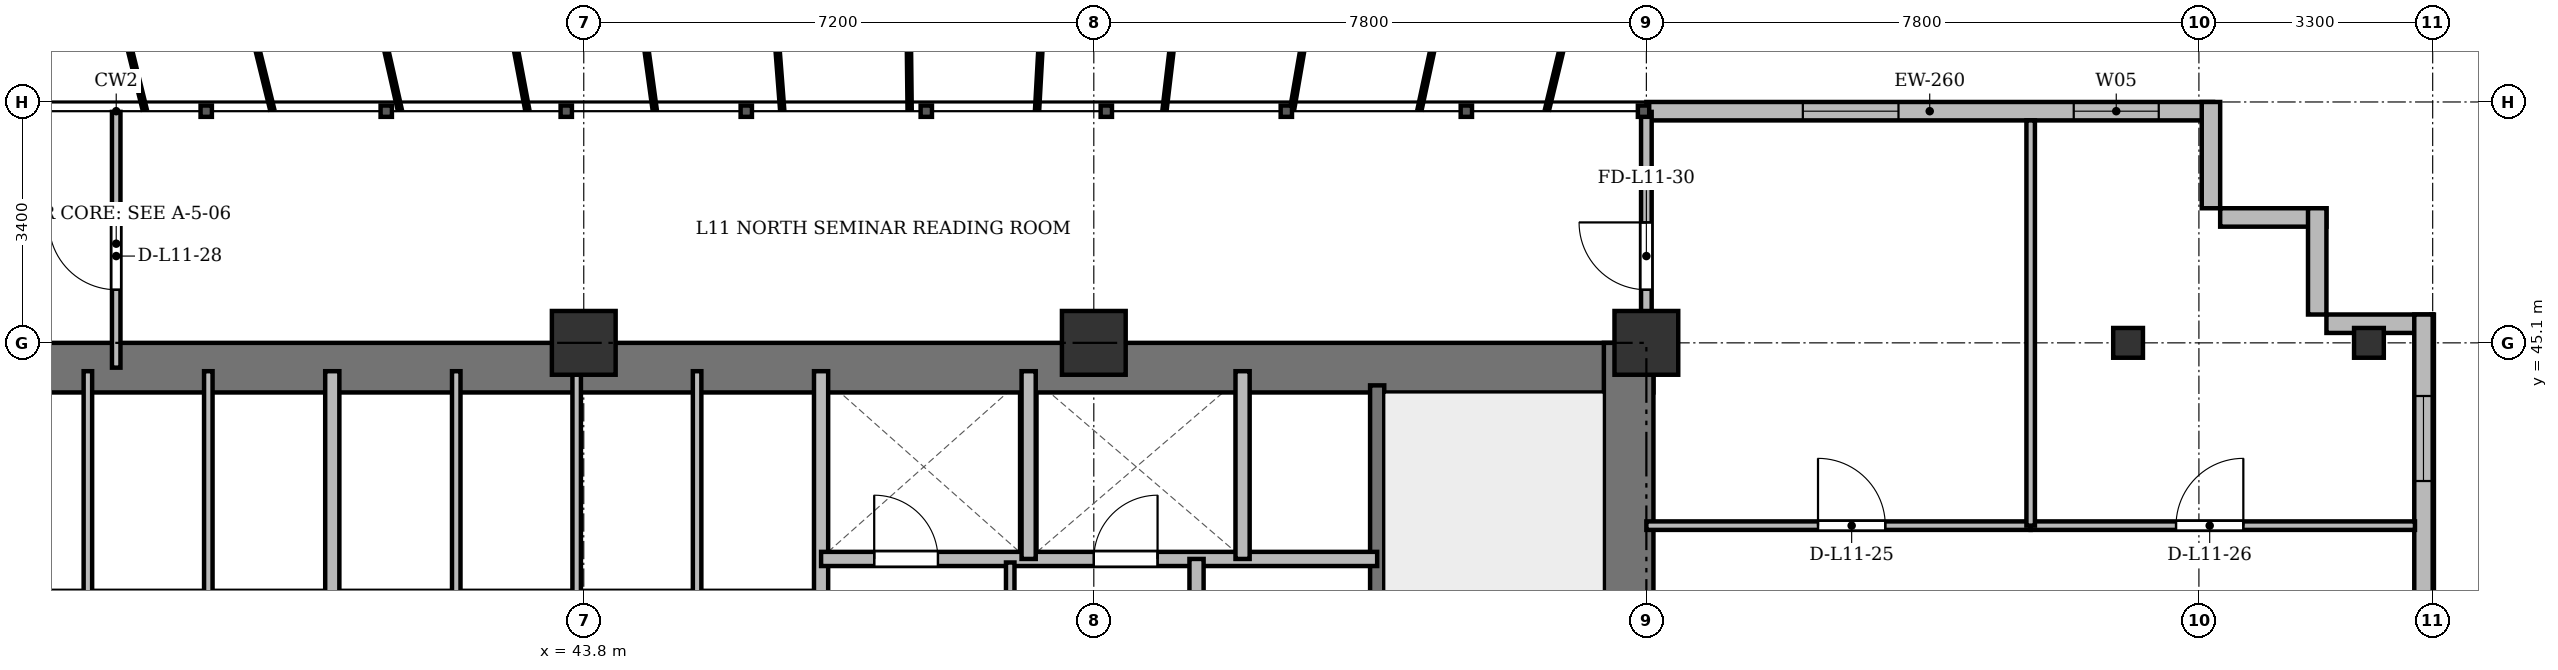
"""IFC4 building model, lengths in metres.
Left out: names, types, materials, properties, quantities, classifications, styles, units other than length and angle.
Written with IfcOpenShell. Run it as: python <this file> out.ifc"""

import sys

from ifc_helpers import new_model, si_unit, direction, frame, frame_2d, origin, origin_2d, place, context, subcontext, project, spatial, rectangle, i_section, extrude, source, transform, mapped, element, fill, save


model = new_model("IFC4")
c1 = context("Model", 3, precision=1e-05, world=origin(), true_north=direction((0.0, 1.0)))
c2 = subcontext(c1, "Body", "Model", "MODEL_VIEW")
j1 = project(units=[si_unit("LENGTHUNIT", "METRE"), si_unit("PLANEANGLEUNIT", "RADIAN")], contexts=[c1])
p1 = place(None, origin())
s1 = spatial("IfcSite", under=j1, at=p1, CompositionType="ELEMENT")
p2 = place(p1, origin())
s2 = spatial("IfcBuilding", under=s1, at=p2, CompositionType="ELEMENT")
p3 = place(p2, frame((0.0, 0.0, 45.1)))
s3 = spatial("IfcBuildingStorey", under=s2, at=p3, CompositionType="ELEMENT", Elevation=45.1)
m1 = source(origin(), c2, "Body", "SweptSolid", [
    extrude(rectangle(XDim=0.9, YDim=0.9, at=origin_2d()), origin(), (0.0, 0.0, 1.0), 3.6),
])
for number, where, z_axis, x_axis in (
    (1, (43.8, 45.1, 0.0), (0.0, 0.0, 1.0), (1.0, 0.0, 0.0)),
    (2, (51.0, 45.1, 0.0), (0.0, 0.0, 1.0), (1.0, 0.0, 0.0)),
    (3, (58.8, 45.1, 0.0), (0.0, 0.0, 1.0), (1.0, 0.0, 0.0)),
):
    element("IfcColumn", number, at=place(p3, frame(where, z_axis=z_axis, x_axis=x_axis)), inside=s3, PredefinedType="COLUMN", context=c2, shape_type="MappedRepresentation", body=[
        mapped(m1, transform((0.0, 0.0, 0.0), x_axis=(1.0, 0.0, 0.0), y_axis=(0.0, 1.0, 0.0), z_axis=(0.0, 0.0, 1.0), scale=1.0)),
    ])
m2 = source(origin(), c2, "Body", "SweptSolid", [
    extrude(i_section(OverallWidth=0.42, OverallDepth=0.42, WebThickness=0.026, FlangeThickness=0.04, at=origin_2d()), origin(), (0.0, 0.0, 1.0), 3.6),
])
for number, where, z_axis, x_axis in (
    (4, (65.6, 45.1, 0.0), (0.0, 0.0, 1.0), (1.0, 0.0, 0.0)),
    (5, (69.0, 45.1, 0.0), (0.0, 0.0, 1.0), (1.0, 0.0, 0.0)),
):
    element("IfcColumn", number, at=place(p3, frame(where, z_axis=z_axis, x_axis=x_axis)), inside=s3, PredefinedType="COLUMN", context=c2, shape_type="MappedRepresentation", body=[
        mapped(m2, transform((0.0, 0.0, 0.0), x_axis=(1.0, 0.0, 0.0), y_axis=(0.0, 1.0, 0.0), z_axis=(0.0, 0.0, 1.0), scale=1.0)),
    ])
p4 = place(p3, frame((58.8, 48.37, 0.0), z_axis=(0.0, 0.0, 1.0), x_axis=(1.0, 0.0, 0.0)))
e6 = element("IfcWall", 6, at=p4, inside=s3, PredefinedType="SOLIDWALL", context=c2, shape_type="SweptSolid", body=[
    extrude(rectangle(XDim=8.0, YDim=0.26, at=frame_2d((4.0, 0.0))), origin(), (0.0, 0.0, 1.0), 3.34),
])
p5 = place(p4, frame((2.209, 0.0, 0.9)))
e7 = element("IfcOpeningElement", 7, at=p5, cuts=e6, PredefinedType="OPENING", context=c2, shape_type="SweptSolid", body=[
    extrude(rectangle(XDim=1.35, YDim=1.5, at=frame_2d((0.675, 0.75))), frame((0.0, 0.14, 0.0), z_axis=(0.0, -1.0, 0.0), x_axis=(1.0, 0.0, 0.0)), (0.0, 0.0, 1.0), 0.28),
])
p6 = place(p4, frame((6.033, 0.0, 0.9)))
e8 = element("IfcOpeningElement", 8, at=p6, cuts=e6, PredefinedType="OPENING", context=c2, shape_type="SweptSolid", body=[
    extrude(rectangle(XDim=1.2, YDim=1.65, at=frame_2d((0.6, 0.825))), frame((0.0, 0.14, 0.0), z_axis=(0.0, -1.0, 0.0), x_axis=(1.0, 0.0, 0.0)), (0.0, 0.0, 1.0), 0.28),
])
for number, where, z_axis, x_axis in (
    (9, (66.77, 48.5, 0.0), (0.0, 0.0, 1.0), (0.0, -1.0, 0.0)),
    (10, (66.9, 46.87, 0.0), (0.0, 0.0, 1.0), (1.0, 0.0, 0.0)),
    (11, (68.27, 47.0, 0.0), (0.0, 0.0, 1.0), (0.0, -1.0, 0.0)),
):
    element("IfcWall", number, at=place(p3, frame(where, z_axis=z_axis, x_axis=x_axis)), inside=s3, PredefinedType="SOLIDWALL", context=c2, shape_type="SweptSolid", body=[
        extrude(rectangle(XDim=1.5, YDim=0.26, at=frame_2d((0.75, 0.0))), origin(), (0.0, 0.0, 1.0), 3.34),
    ])
p7 = place(p3, frame((68.4, 45.37, 0.0), z_axis=(0.0, 0.0, 1.0), x_axis=(1.0, 0.0, 0.0)))
e12 = element("IfcWall", 12, at=p7, inside=s3, PredefinedType="SOLIDWALL", context=c2, shape_type="SweptSolid", body=[
    extrude(rectangle(XDim=1.5, YDim=0.26, at=frame_2d((0.75, 0.0))), origin(), (0.0, 0.0, 1.0), 2.69),
])
p8 = place(p3, frame((69.77, 45.5, 0.0), z_axis=(0.0, 0.0, 1.0), x_axis=(0.0, -1.0, 0.0)))
e13 = element("IfcWall", 13, at=p8, inside=s3, PredefinedType="SOLIDWALL", context=c2, shape_type="SweptSolid", body=[
    extrude(rectangle(XDim=39.6, YDim=0.26, at=frame_2d((19.8, 0.0))), origin(), (0.0, 0.0, 1.0), 3.34),
])
p9 = place(p8, frame((36.95, 0.0, 0.92)))
e14 = element("IfcOpeningElement", 14, at=p9, cuts=e13, PredefinedType="OPENING", context=c2, shape_type="SweptSolid", body=[
    extrude(rectangle(XDim=1.2, YDim=1.65, at=frame_2d((0.6, 0.825))), frame((0.0, 0.14, 0.0), z_axis=(0.0, -1.0, 0.0), x_axis=(1.0, 0.0, 0.0)), (0.0, 0.0, 1.0), 0.28),
])
p10 = place(p8, frame((32.9, 0.0, 0.92)))
e15 = element("IfcOpeningElement", 15, at=p10, cuts=e13, PredefinedType="OPENING", context=c2, shape_type="SweptSolid", body=[
    extrude(rectangle(XDim=2.4, YDim=2.1, at=frame_2d((1.2, 1.05))), frame((0.0, 0.14, 0.0), z_axis=(0.0, -1.0, 0.0), x_axis=(1.0, 0.0, 0.0)), (0.0, 0.0, 1.0), 0.28),
])
p11 = place(p8, frame((28.7, 0.0, 0.92)))
e16 = element("IfcOpeningElement", 16, at=p11, cuts=e13, PredefinedType="OPENING", context=c2, shape_type="SweptSolid", body=[
    extrude(rectangle(XDim=2.4, YDim=2.1, at=frame_2d((1.2, 1.05))), frame((0.0, 0.14, 0.0), z_axis=(0.0, -1.0, 0.0), x_axis=(1.0, 0.0, 0.0)), (0.0, 0.0, 1.0), 0.28),
])
p12 = place(p8, frame((21.5, 0.0, 0.92)))
e17 = element("IfcOpeningElement", 17, at=p12, cuts=e13, PredefinedType="OPENING", context=c2, shape_type="SweptSolid", body=[
    extrude(rectangle(XDim=2.4, YDim=2.1, at=frame_2d((1.2, 1.05))), frame((0.0, 0.14, 0.0), z_axis=(0.0, -1.0, 0.0), x_axis=(1.0, 0.0, 0.0)), (0.0, 0.0, 1.0), 0.28),
])
p13 = place(p8, frame((7.5, 0.0, 0.92)))
e18 = element("IfcOpeningElement", 18, at=p13, cuts=e13, PredefinedType="OPENING", context=c2, shape_type="SweptSolid", body=[
    extrude(rectangle(XDim=2.4, YDim=2.1, at=frame_2d((1.2, 1.05))), frame((0.0, 0.14, 0.0), z_axis=(0.0, -1.0, 0.0), x_axis=(1.0, 0.0, 0.0)), (0.0, 0.0, 1.0), 0.28),
])
p14 = place(p8, frame((4.5, 0.0, 0.92)))
e19 = element("IfcOpeningElement", 19, at=p14, cuts=e13, PredefinedType="OPENING", context=c2, shape_type="SweptSolid", body=[
    extrude(rectangle(XDim=1.2, YDim=1.65, at=frame_2d((0.6, 0.825))), frame((0.0, 0.14, 0.0), z_axis=(0.0, -1.0, 0.0), x_axis=(1.0, 0.0, 0.0)), (0.0, 0.0, 1.0), 0.28),
])
p15 = place(p8, frame((1.15, 0.0, 0.92)))
e20 = element("IfcOpeningElement", 20, at=p15, cuts=e13, PredefinedType="OPENING", context=c2, shape_type="SweptSolid", body=[
    extrude(rectangle(XDim=1.2, YDim=1.65, at=frame_2d((0.6, 0.825))), frame((0.0, 0.14, 0.0), z_axis=(0.0, -1.0, 0.0), x_axis=(1.0, 0.0, 0.0)), (0.0, 0.0, 1.0), 0.28),
])
p16 = place(p3, frame((15.5, 44.75, 0.0), z_axis=(0.0, 0.0, 1.0), x_axis=(1.0, 0.0, 0.0)))
e21 = element("IfcWall", 21, at=p16, inside=s3, PredefinedType="SHEAR", context=c2, shape_type="SweptSolid", body=[
    extrude(rectangle(XDim=43.4, YDim=0.7, at=frame_2d((21.7, 0.0))), origin(), (0.0, 0.0, 1.0), 3.34),
])
p17 = place(p3, frame((58.55, 33.4, 0.0), z_axis=(0.0, 0.0, 1.0), x_axis=(0.0, 1.0, 0.0)))
e22 = element("IfcWall", 22, at=p17, inside=s3, PredefinedType="SHEAR", context=c2, shape_type="SweptSolid", body=[
    extrude(rectangle(XDim=11.7, YDim=0.7, at=frame_2d((5.85, 0.0))), origin(), (0.0, 0.0, 1.0), 3.34),
])
p18 = place(p3, frame((55.0, 33.4, 0.0), z_axis=(0.0, 0.0, 1.0), x_axis=(0.0, 1.0, 0.0)))
e23 = element("IfcWall", 23, at=p18, inside=s3, PredefinedType="SHEAR", context=c2, shape_type="SweptSolid", body=[
    extrude(rectangle(XDim=11.1, YDim=0.2, at=frame_2d((5.55, 0.0))), origin(), (0.0, 0.0, 1.0), 3.34),
])
p19 = place(p18, frame((0.85, 0.0, 0.0)))
e24 = element("IfcOpeningElement", 24, at=p19, cuts=e23, PredefinedType="OPENING", context=c2, shape_type="SweptSolid", body=[
    extrude(rectangle(XDim=1.1, YDim=2.15, at=frame_2d((0.55, 1.075))), frame((0.0, 0.11, 0.0), z_axis=(0.0, -1.0, 0.0), x_axis=(1.0, 0.0, 0.0)), (0.0, 0.0, 1.0), 0.22),
])
for number, where, z_axis, x_axis in (
    (25, (36.8, 41.5, 0.0), (0.0, 0.0, 1.0), (0.0, 1.0, 0.0)),
    (26, (38.5, 41.5, 0.0), (0.0, 0.0, 1.0), (0.0, 1.0, 0.0)),
):
    element("IfcWall", number, at=place(p3, frame(where, z_axis=z_axis, x_axis=x_axis)), inside=s3, PredefinedType="PARTITIONING", context=c2, shape_type="SweptSolid", body=[
        extrude(rectangle(XDim=3.2, YDim=0.12, at=frame_2d((1.6, 0.0))), origin(), (0.0, 0.0, 1.0), 3.34),
    ])
p20 = place(p3, frame((40.25, 41.5, 0.0), z_axis=(0.0, 0.0, 1.0), x_axis=(0.0, 1.0, 0.0)))
e27 = element("IfcWall", 27, at=p20, inside=s3, PredefinedType="SOLIDWALL", context=c2, shape_type="SweptSolid", body=[
    extrude(rectangle(XDim=3.2, YDim=0.2, at=frame_2d((1.6, 0.0))), origin(), (0.0, 0.0, 1.0), 3.34),
])
p21 = place(p3, frame((42.0, 41.5, 0.0), z_axis=(0.0, 0.0, 1.0), x_axis=(0.0, 1.0, 0.0)))
e28 = element("IfcWall", 28, at=p21, inside=s3, PredefinedType="PARTITIONING", context=c2, shape_type="SweptSolid", body=[
    extrude(rectangle(XDim=3.2, YDim=0.12, at=frame_2d((1.6, 0.0))), origin(), (0.0, 0.0, 1.0), 3.34),
])
p22 = place(p3, frame((43.7, 41.5, 0.0), z_axis=(0.0, 0.0, 1.0), x_axis=(0.0, 1.0, 0.0)))
e29 = element("IfcWall", 29, at=p22, inside=s3, PredefinedType="PARTITIONING", context=c2, shape_type="SweptSolid", body=[
    extrude(rectangle(XDim=3.2, YDim=0.12, at=frame_2d((1.6, 0.0))), origin(), (0.0, 0.0, 1.0), 2.752),
])
p23 = place(p3, frame((45.4, 41.5, 0.0), z_axis=(0.0, 0.0, 1.0), x_axis=(0.0, 1.0, 0.0)))
e30 = element("IfcWall", 30, at=p23, inside=s3, PredefinedType="PARTITIONING", context=c2, shape_type="SweptSolid", body=[
    extrude(rectangle(XDim=3.2, YDim=0.12, at=frame_2d((1.6, 0.0))), origin(), (0.0, 0.0, 1.0), 3.34),
])
p24 = place(p3, frame((47.15, 33.4, 0.0), z_axis=(0.0, 0.0, 1.0), x_axis=(0.0, 1.0, 0.0)))
e31 = element("IfcWall", 31, at=p24, inside=s3, PredefinedType="SOLIDWALL", context=c2, shape_type="SweptSolid", body=[
    extrude(rectangle(XDim=11.3, YDim=0.2, at=frame_2d((5.65, 0.0))), origin(), (0.0, 0.0, 1.0), 2.69),
])
p25 = place(p3, frame((47.15, 42.05, 0.0), z_axis=(0.0, 0.0, 1.0), x_axis=(1.0, 0.0, 0.0)))
e32 = element("IfcWall", 32, at=p25, inside=s3, PredefinedType="SOLIDWALL", context=c2, shape_type="SweptSolid", body=[
    extrude(rectangle(XDim=7.85, YDim=0.2, at=frame_2d((3.925, 0.0))), origin(), (0.0, 0.0, 1.0), 2.752),
])
p26 = place(p25, frame((0.75, 0.0, 0.0)))
e33 = element("IfcOpeningElement", 33, at=p26, cuts=e32, PredefinedType="OPENING", context=c2, shape_type="SweptSolid", body=[
    extrude(rectangle(XDim=0.9, YDim=2.1, at=frame_2d((0.45, 1.05))), frame((0.0, 0.11, 0.0), z_axis=(0.0, -1.0, 0.0), x_axis=(1.0, 0.0, 0.0)), (0.0, 0.0, 1.0), 0.22),
])
p27 = place(p25, frame((3.85, 0.0, 0.0)))
e34 = element("IfcOpeningElement", 34, at=p27, cuts=e32, PredefinedType="OPENING", context=c2, shape_type="SweptSolid", body=[
    extrude(rectangle(XDim=0.9, YDim=2.1, at=frame_2d((0.45, 1.05))), frame((0.0, 0.11, 0.0), z_axis=(0.0, -1.0, 0.0), x_axis=(1.0, 0.0, 0.0)), (0.0, 0.0, 1.0), 0.22),
])
for number, where, z_axis, x_axis in (
    (35, (50.08, 42.05, 0.0), (0.0, 0.0, 1.0), (0.0, 1.0, 0.0)),
    (36, (53.1, 42.05, 0.0), (0.0, 0.0, 1.0), (0.0, 1.0, 0.0)),
):
    element("IfcWall", number, at=place(p3, frame(where, z_axis=z_axis, x_axis=x_axis)), inside=s3, PredefinedType="SOLIDWALL", context=c2, shape_type="SweptSolid", body=[
        extrude(rectangle(XDim=2.65, YDim=0.2, at=frame_2d((1.325, 0.0))), origin(), (0.0, 0.0, 1.0), 3.34),
    ])
p28 = place(p3, frame((52.45, 33.4, 0.0), z_axis=(0.0, 0.0, 1.0), x_axis=(0.0, 1.0, 0.0)))
e37 = element("IfcWall", 37, at=p28, inside=s3, PredefinedType="PARTITIONING", context=c2, shape_type="SweptSolid", body=[
    extrude(rectangle(XDim=8.65, YDim=0.2, at=frame_2d((4.325, 0.0))), origin(), (0.0, 0.0, 1.0), 2.69),
])
p29 = place(p28, frame((6.2, 0.0, 0.0)))
e38 = element("IfcOpeningElement", 38, at=p29, cuts=e37, PredefinedType="OPENING", context=c2, shape_type="SweptSolid", body=[
    extrude(rectangle(XDim=0.95, YDim=2.15, at=frame_2d((0.475, 1.075))), frame((0.0, 0.11, 0.0), z_axis=(0.0, -1.0, 0.0), x_axis=(1.0, 0.0, 0.0)), (0.0, 0.0, 1.0), 0.22),
])
p30 = place(p3, frame((49.82, 36.18, 0.0), z_axis=(0.0, 0.0, 1.0), x_axis=(0.0, 1.0, 0.0)))
e39 = element("IfcWall", 39, at=p30, inside=s3, PredefinedType="PARTITIONING", context=c2, shape_type="SweptSolid", body=[
    extrude(rectangle(XDim=5.82, YDim=0.12, at=frame_2d((2.91, 0.0))), origin(), (0.0, 0.0, 1.0), 3.34),
])
p31 = place(p3, frame((58.8, 42.52, 0.0), z_axis=(0.0, 0.0, 1.0), x_axis=(1.0, 0.0, 0.0)))
e40 = element("IfcWall", 40, at=p31, inside=s3, PredefinedType="PARTITIONING", context=c2, shape_type="SweptSolid", body=[
    extrude(rectangle(XDim=5.425, YDim=0.12, at=frame_2d((2.712, 0.0))), origin(), (0.0, 0.0, 1.0), 2.752),
])
p32 = place(p31, frame((2.423, 0.0, 0.0)))
e41 = element("IfcOpeningElement", 41, at=p32, cuts=e40, PredefinedType="OPENING", context=c2, shape_type="SweptSolid", body=[
    extrude(rectangle(XDim=0.95, YDim=2.15, at=frame_2d((0.475, 1.075))), frame((0.0, 0.07, 0.0), z_axis=(0.0, -1.0, 0.0), x_axis=(1.0, 0.0, 0.0)), (0.0, 0.0, 1.0), 0.14),
])
p33 = place(p3, frame((64.225, 42.52, 0.0), z_axis=(0.0, 0.0, 1.0), x_axis=(1.0, 0.0, 0.0)))
e42 = element("IfcWall", 42, at=p33, inside=s3, PredefinedType="PARTITIONING", context=c2, shape_type="SweptSolid", body=[
    extrude(rectangle(XDim=5.425, YDim=0.12, at=frame_2d((2.712, 0.0))), origin(), (0.0, 0.0, 1.0), 2.752),
])
p34 = place(p33, frame((2.052, 0.0, 0.0)))
e43 = element("IfcOpeningElement", 43, at=p34, cuts=e42, PredefinedType="OPENING", context=c2, shape_type="SweptSolid", body=[
    extrude(rectangle(XDim=0.95, YDim=2.15, at=frame_2d((0.475, 1.075))), frame((0.0, 0.07, 0.0), z_axis=(0.0, -1.0, 0.0), x_axis=(1.0, 0.0, 0.0)), (0.0, 0.0, 1.0), 0.14),
])
p35 = place(p3, frame((64.225, 42.52, 0.0), z_axis=(0.0, 0.0, 1.0), x_axis=(0.0, 1.0, 0.0)))
e44 = element("IfcWall", 44, at=p35, inside=s3, PredefinedType="PARTITIONING", context=c2, shape_type="SweptSolid", body=[
    extrude(rectangle(XDim=5.72, YDim=0.12, at=frame_2d((2.86, 0.0))), origin(), (0.0, 0.0, 1.0), 2.69),
])
p36 = place(p3, frame((37.2, 44.75, 0.0), z_axis=(0.0, 0.0, 1.0), x_axis=(0.0, 1.0, 0.0)))
e45 = element("IfcWall", 45, at=p36, inside=s3, PredefinedType="PARTITIONING", context=c2, shape_type="SweptSolid", body=[
    extrude(rectangle(XDim=3.61, YDim=0.12, at=frame_2d((1.805, 0.0))), origin(), (0.0, 0.0, 1.0), 2.69),
])
p37 = place(p36, frame((1.1, 0.0, 0.0)))
e46 = element("IfcOpeningElement", 46, at=p37, cuts=e45, PredefinedType="OPENING", context=c2, shape_type="SweptSolid", body=[
    extrude(rectangle(XDim=0.95, YDim=2.15, at=frame_2d((0.475, 1.075))), frame((0.0, 0.07, 0.0), z_axis=(0.0, -1.0, 0.0), x_axis=(1.0, 0.0, 0.0)), (0.0, 0.0, 1.0), 0.14),
])
p38 = place(p3, frame((58.8, 44.75, 0.0), z_axis=(0.0, 0.0, 1.0), x_axis=(0.0, 1.0, 0.0)))
e47 = element("IfcWall", 47, at=p38, inside=s3, PredefinedType="PARTITIONING", context=c2, shape_type="SweptSolid", body=[
    extrude(rectangle(XDim=3.61, YDim=0.15, at=frame_2d((1.805, 0.0))), origin(), (0.0, 0.0, 1.0), 2.752),
])
p39 = place(p38, frame((1.1, 0.0, 0.0)))
e48 = element("IfcOpeningElement", 48, at=p39, cuts=e47, PredefinedType="OPENING", context=c2, shape_type="SweptSolid", body=[
    extrude(rectangle(XDim=0.95, YDim=2.15, at=frame_2d((0.475, 1.075))), frame((0.0, 0.085, 0.0), z_axis=(0.0, -1.0, 0.0), x_axis=(1.0, 0.0, 0.0)), (0.0, 0.0, 1.0), 0.17),
])
m3 = source(origin(), c2, "Body", "SweptSolid", [
    extrude(rectangle(XDim=1.35, YDim=1.5, at=frame_2d((0.675, 0.75))), frame((0.0, 0.03, 0.0), z_axis=(0.0, -1.0, 0.0), x_axis=(1.0, 0.0, 0.0)), (0.0, 0.0, 1.0), 0.06),
])
p40 = place(p5, origin())
e49 = element("IfcWindow", 49, at=p40, inside=s3, PartitioningType="SINGLE_PANEL", PredefinedType="WINDOW", context=c2, shape_type="MappedRepresentation", body=[
    mapped(m3, transform((0.0, 0.0, 0.0), x_axis=(1.0, 0.0, 0.0), y_axis=(0.0, 1.0, 0.0), z_axis=(0.0, 0.0, 1.0), scale=1.0)),
])
fill(e7, e49)
m4 = source(origin(), c2, "Body", "SweptSolid", [
    extrude(rectangle(XDim=1.2, YDim=1.65, at=frame_2d((0.6, 0.825))), frame((0.0, 0.03, 0.0), z_axis=(0.0, -1.0, 0.0), x_axis=(1.0, 0.0, 0.0)), (0.0, 0.0, 1.0), 0.06),
])
p41 = place(p6, origin())
e50 = element("IfcWindow", 50, at=p41, inside=s3, PartitioningType="SINGLE_PANEL", PredefinedType="WINDOW", context=c2, shape_type="MappedRepresentation", body=[
    mapped(m4, transform((0.0, 0.0, 0.0), x_axis=(1.0, 0.0, 0.0), y_axis=(0.0, 1.0, 0.0), z_axis=(0.0, 0.0, 1.0), scale=1.0)),
])
fill(e8, e50)
p42 = place(p15, origin())
e51 = element("IfcWindow", 51, at=p42, inside=s3, PartitioningType="SINGLE_PANEL", PredefinedType="WINDOW", context=c2, shape_type="MappedRepresentation", body=[
    mapped(m4, transform((0.0, 0.0, 0.0), x_axis=(1.0, 0.0, 0.0), y_axis=(0.0, 1.0, 0.0), z_axis=(0.0, 0.0, 1.0), scale=1.0)),
])
fill(e20, e51)
m5 = source(origin(), c2, "Body", "SweptSolid", [
    extrude(rectangle(XDim=0.9, YDim=2.1, at=frame_2d((0.45, 1.05))), frame((0.0, 0.025, 0.0), z_axis=(0.0, -1.0, 0.0), x_axis=(1.0, 0.0, 0.0)), (0.0, 0.0, 1.0), 0.05),
])
p43 = place(p26, origin())
e52 = element("IfcDoor", 52, at=p43, inside=s3, OperationType="SINGLE_SWING_LEFT", PredefinedType="DOOR", context=c2, shape_type="MappedRepresentation", body=[
    mapped(m5, transform((0.0, 0.0, 0.0), x_axis=(1.0, 0.0, 0.0), y_axis=(0.0, 1.0, 0.0), z_axis=(0.0, 0.0, 1.0), scale=1.0)),
])
fill(e33, e52)
p44 = place(p27, origin())
e53 = element("IfcDoor", 53, at=p44, inside=s3, OperationType="SINGLE_SWING_RIGHT", PredefinedType="DOOR", context=c2, shape_type="MappedRepresentation", body=[
    mapped(m5, transform((0.0, 0.0, 0.0), x_axis=(1.0, 0.0, 0.0), y_axis=(0.0, 1.0, 0.0), z_axis=(0.0, 0.0, 1.0), scale=1.0)),
])
fill(e34, e53)
m6 = source(origin(), c2, "Body", "SweptSolid", [
    extrude(rectangle(XDim=0.95, YDim=2.15, at=frame_2d((0.475, 1.075))), frame((0.0, 0.025, 0.0), z_axis=(0.0, -1.0, 0.0), x_axis=(1.0, 0.0, 0.0)), (0.0, 0.0, 1.0), 0.05),
])
p45 = place(p32, origin())
e54 = element("IfcDoor", 54, at=p45, inside=s3, OperationType="SINGLE_SWING_LEFT", PredefinedType="DOOR", context=c2, shape_type="MappedRepresentation", body=[
    mapped(m6, transform((0.0, 0.0, 0.0), x_axis=(1.0, 0.0, 0.0), y_axis=(0.0, 1.0, 0.0), z_axis=(0.0, 0.0, 1.0), scale=1.0)),
])
fill(e41, e54)
p46 = place(p34, origin())
e55 = element("IfcDoor", 55, at=p46, inside=s3, OperationType="SINGLE_SWING_RIGHT", PredefinedType="DOOR", context=c2, shape_type="MappedRepresentation", body=[
    mapped(m6, transform((0.0, 0.0, 0.0), x_axis=(1.0, 0.0, 0.0), y_axis=(0.0, 1.0, 0.0), z_axis=(0.0, 0.0, 1.0), scale=1.0)),
])
fill(e43, e55)
p47 = place(p37, origin())
e56 = element("IfcDoor", 56, at=p47, inside=s3, OperationType="SINGLE_SWING_RIGHT", PredefinedType="DOOR", context=c2, shape_type="MappedRepresentation", body=[
    mapped(m6, transform((0.0, 0.0, 0.0), x_axis=(1.0, 0.0, 0.0), y_axis=(0.0, 1.0, 0.0), z_axis=(0.0, 0.0, 1.0), scale=1.0)),
])
fill(e46, e56)
p48 = place(p39, origin())
e57 = element("IfcDoor", 57, at=p48, inside=s3, OperationType="SINGLE_SWING_RIGHT", PredefinedType="DOOR", context=c2, shape_type="MappedRepresentation", body=[
    mapped(m6, transform((0.0, 0.0, 0.0), x_axis=(1.0, 0.0, 0.0), y_axis=(0.0, 1.0, 0.0), z_axis=(0.0, 0.0, 1.0), scale=1.0)),
])
fill(e48, e57)
save(model, sys.argv[1])
